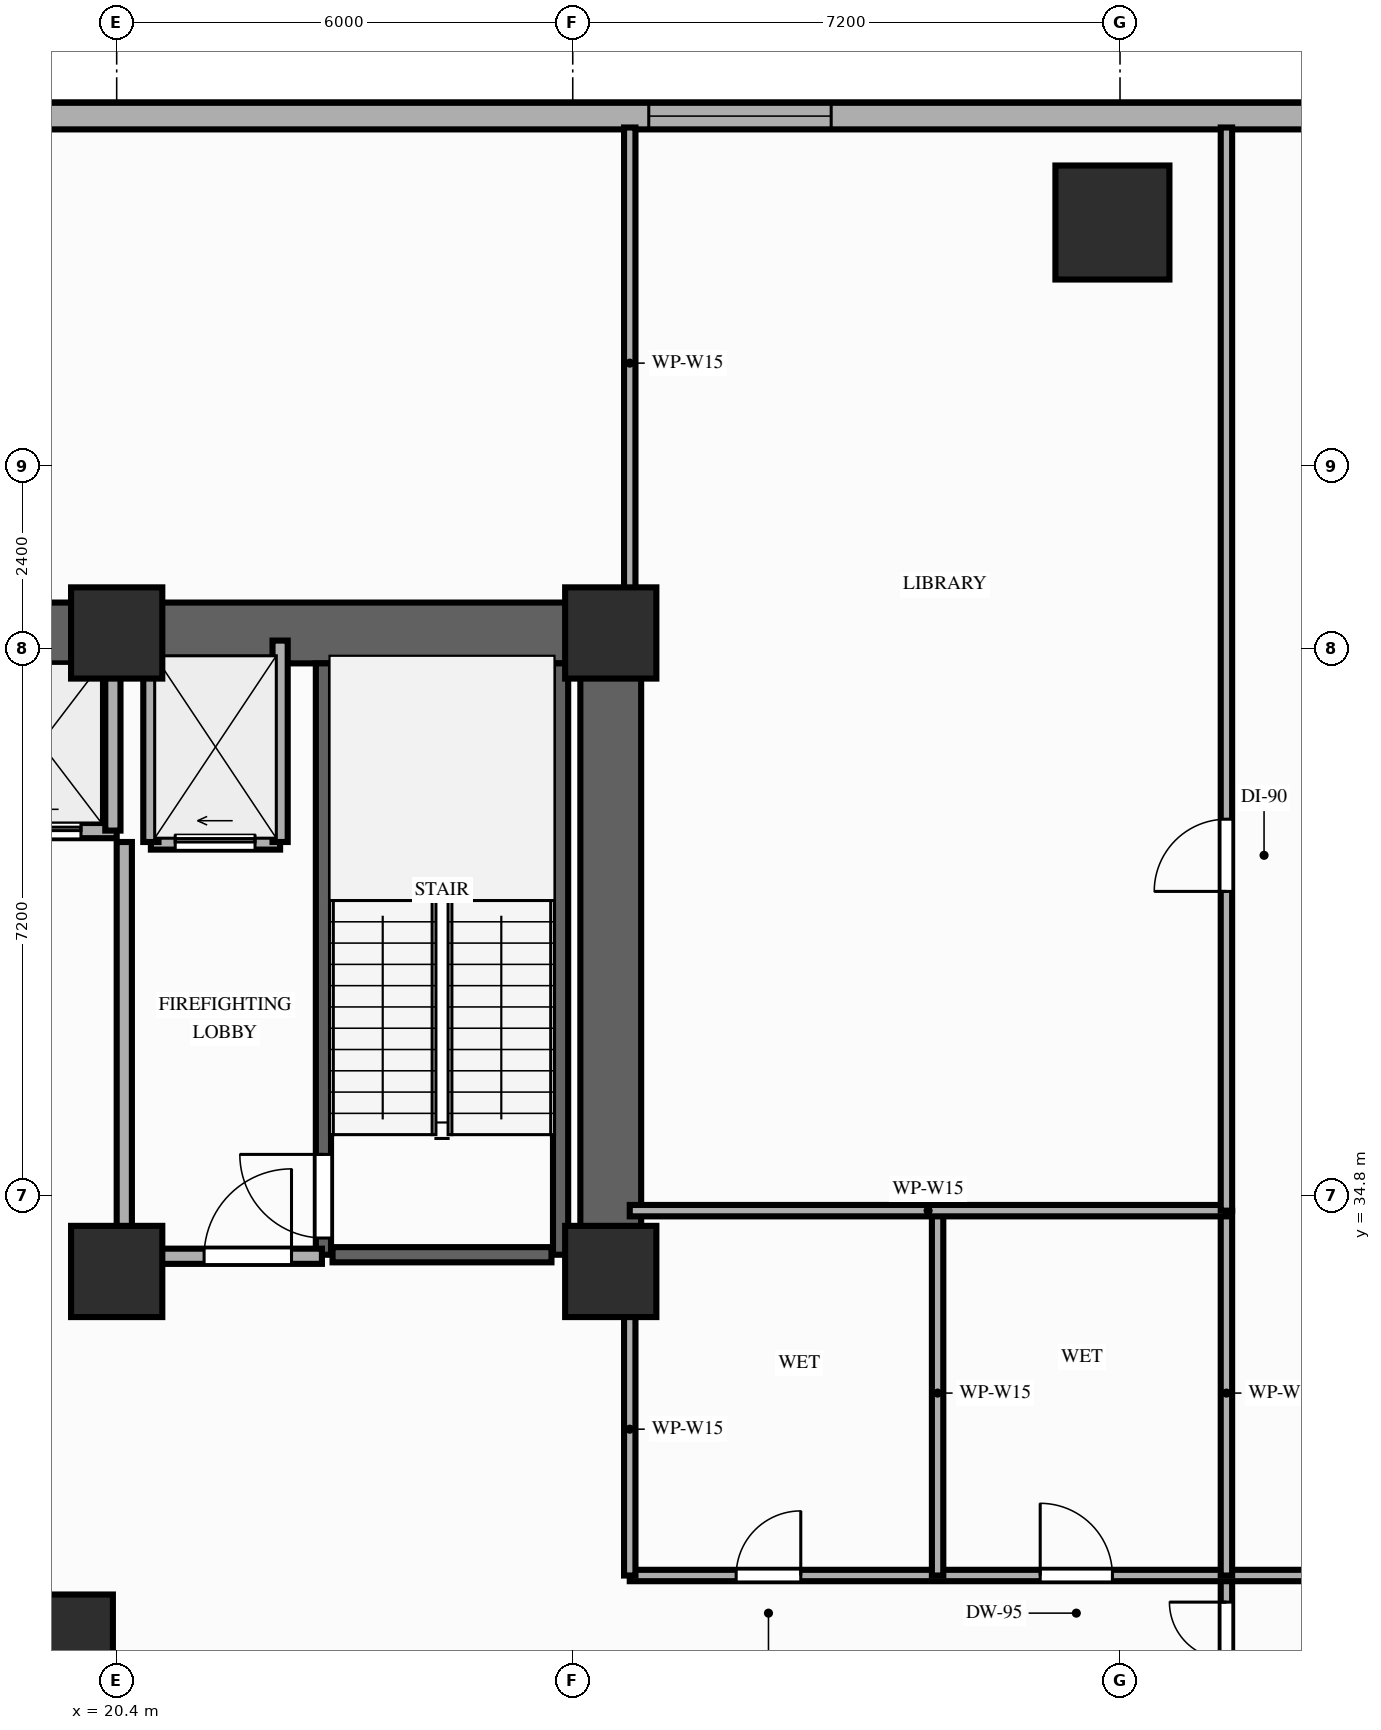
"""IFC4 building model, lengths in metres.
Left out: names, types, materials, properties, quantities, classifications, styles, units other than length and angle.
Written with IfcOpenShell. Run it as: python <this file> out.ifc"""

import sys

from ifc_helpers import new_model, si_unit, direction, frame, frame_2d, origin, origin_2d, place, context, subcontext, project, spatial, rectangle, extrude, element, fill, save


model = new_model("IFC4")
c1 = context("Model", 3, precision=1e-05, world=origin(), true_north=direction((0.0, 1.0)))
c2 = subcontext(c1, "Body", "Model", "MODEL_VIEW")
j1 = project(units=[si_unit("LENGTHUNIT", "METRE"), si_unit("PLANEANGLEUNIT", "RADIAN")], contexts=[c1])
p1 = place(None, origin())
s1 = spatial("IfcSite", under=j1, at=p1, CompositionType="ELEMENT")
p2 = place(p1, origin())
s2 = spatial("IfcBuilding", under=s1, at=p2, CompositionType="ELEMENT")
p3 = place(p2, frame((0.0, 0.0, 17.6)))
s3 = spatial("IfcBuildingStorey", under=s2, at=p3, CompositionType="ELEMENT", Elevation=17.6)
for number, where, z_axis, x_axis in (
    (1, (20.4, 33.8, 0.0), (0.0, 0.0, 1.0), (1.0, 0.0, 0.0)),
    (2, (26.9, 33.8, 0.0), (0.0, 0.0, 1.0), (1.0, 0.0, 0.0)),
    (3, (20.4, 42.2, 0.0), (0.0, 0.0, 1.0), (1.0, 0.0, 0.0)),
    (4, (26.9, 42.2, 0.0), (0.0, 0.0, 1.0), (1.0, 0.0, 0.0)),
):
    element("IfcColumn", number, at=place(p3, frame(where, z_axis=z_axis, x_axis=x_axis)), inside=s3, PredefinedType="COLUMN", context=c2, shape_type="SweptSolid", body=[
        extrude(rectangle(XDim=1.2, YDim=1.2, at=origin_2d()), origin(), (0.0, 0.0, 1.0), 4.2),
    ])
for number, where, z_axis, x_axis in (
    (5, (19.6, 28.8, 0.0), (0.0, 0.0, 1.0), (1.0, 0.0, 0.0)),
    (6, (33.5, 47.6, 0.0), (0.0, 0.0, 1.0), (1.0, 0.0, 0.0)),
):
    element("IfcColumn", number, at=place(p3, frame(where, z_axis=z_axis, x_axis=x_axis)), inside=s3, PredefinedType="COLUMN", context=c2, shape_type="SweptSolid", body=[
        extrude(rectangle(XDim=1.5, YDim=1.5, at=origin_2d()), origin(), (0.0, 0.0, 1.0), 4.2),
    ])
p4 = place(p3, frame((73.2, 49.0, 0.0), z_axis=(0.0, 0.0, 1.0), x_axis=(-1.0, 0.0, 0.0)))
e7 = element("IfcWall", 7, at=p4, inside=s3, PredefinedType="STANDARD", context=c2, shape_type="SweptSolid", body=[
    extrude(rectangle(XDim=69.6, YDim=0.35, at=frame_2d((34.8, 0.0))), origin(), (0.0, 0.0, 1.0), 3.9),
])
p5 = place(p4, frame((3.4, 0.0, 0.9)))
e8 = element("IfcOpeningElement", 8, at=p5, cuts=e7, PredefinedType="OPENING", context=c2, shape_type="SweptSolid", body=[
    extrude(rectangle(XDim=2.4, YDim=2.15, at=frame_2d((1.2, 1.075))), frame((0.0, 0.185, 0.0), z_axis=(0.0, -1.0, 0.0), x_axis=(1.0, 0.0, 0.0)), (0.0, 0.0, 1.0), 0.37),
])
p6 = place(p4, frame((19.2, 0.0, 0.9)))
e9 = element("IfcOpeningElement", 9, at=p6, cuts=e7, PredefinedType="OPENING", context=c2, shape_type="SweptSolid", body=[
    extrude(rectangle(XDim=2.4, YDim=2.15, at=frame_2d((1.2, 1.075))), frame((0.0, 0.185, 0.0), z_axis=(0.0, -1.0, 0.0), x_axis=(1.0, 0.0, 0.0)), (0.0, 0.0, 1.0), 0.37),
])
p7 = place(p4, frame((31.2, 0.0, 0.9)))
e10 = element("IfcOpeningElement", 10, at=p7, cuts=e7, PredefinedType="OPENING", context=c2, shape_type="SweptSolid", body=[
    extrude(rectangle(XDim=2.4, YDim=2.15, at=frame_2d((1.2, 1.075))), frame((0.0, 0.185, 0.0), z_axis=(0.0, -1.0, 0.0), x_axis=(1.0, 0.0, 0.0)), (0.0, 0.0, 1.0), 0.37),
])
p8 = place(p4, frame((43.4, 0.0, 0.9)))
e11 = element("IfcOpeningElement", 11, at=p8, cuts=e7, PredefinedType="OPENING", context=c2, shape_type="SweptSolid", body=[
    extrude(rectangle(XDim=2.4, YDim=2.15, at=frame_2d((1.2, 1.075))), frame((0.0, 0.185, 0.0), z_axis=(0.0, -1.0, 0.0), x_axis=(1.0, 0.0, 0.0)), (0.0, 0.0, 1.0), 0.37),
])
p9 = place(p4, frame((55.6, 0.0, 0.9)))
e12 = element("IfcOpeningElement", 12, at=p9, cuts=e7, PredefinedType="OPENING", context=c2, shape_type="SweptSolid", body=[
    extrude(rectangle(XDim=2.4, YDim=2.15, at=frame_2d((1.2, 1.075))), frame((0.0, 0.185, 0.0), z_axis=(0.0, -1.0, 0.0), x_axis=(1.0, 0.0, 0.0)), (0.0, 0.0, 1.0), 0.37),
])
p10 = place(p3, frame((6.45, 42.2, 0.0), z_axis=(0.0, 0.0, 1.0), x_axis=(1.0, 0.0, 0.0)))
e13 = element("IfcWall", 13, at=p10, inside=s3, PredefinedType="SHEAR", context=c2, shape_type="SweptSolid", body=[
    extrude(rectangle(XDim=20.45, YDim=0.8, at=frame_2d((10.225, 0.0))), origin(), (0.0, 0.0, 1.0), 3.9),
])
p11 = place(p3, frame((26.9, 33.8, 0.0), z_axis=(0.0, 0.0, 1.0), x_axis=(0.0, 1.0, 0.0)))
e14 = element("IfcWall", 14, at=p11, inside=s3, PredefinedType="SHEAR", context=c2, shape_type="SweptSolid", body=[
    extrude(rectangle(XDim=7.95, YDim=0.8, at=frame_2d((3.975, 0.0))), origin(), (0.0, 0.0, 1.0), 3.9),
])
p12 = place(p3, frame((23.12, 34.02, 0.0), z_axis=(0.0, 0.0, 1.0), x_axis=(0.0, 1.0, 0.0)))
e15 = element("IfcWall", 15, at=p12, inside=s3, PredefinedType="SHEAR", context=c2, shape_type="SweptSolid", body=[
    extrude(rectangle(XDim=7.78, YDim=0.2, at=frame_2d((3.89, 0.0))), origin(), (0.0, 0.0, 1.0), 3.9),
])
p13 = place(p12, frame((0.22, 0.0, 0.0)))
e16 = element("IfcOpeningElement", 16, at=p13, cuts=e15, PredefinedType="OPENING", context=c2, shape_type="SweptSolid", body=[
    extrude(rectangle(XDim=1.1, YDim=2.15, at=frame_2d((0.55, 1.075))), frame((0.0, 0.11, 0.0), z_axis=(0.0, -1.0, 0.0), x_axis=(1.0, 0.0, 0.0)), (0.0, 0.0, 1.0), 0.22),
])
p14 = place(p3, frame((26.24, 34.02, 0.0), z_axis=(0.0, 0.0, 1.0), x_axis=(0.0, 1.0, 0.0)))
e17 = element("IfcWall", 17, at=p14, inside=s3, PredefinedType="SHEAR", context=c2, shape_type="SweptSolid", body=[
    extrude(rectangle(XDim=7.78, YDim=0.2, at=frame_2d((3.89, 0.0))), origin(), (0.0, 0.0, 1.0), 3.9),
])
p15 = place(p3, frame((23.24, 34.02, 0.0), z_axis=(0.0, 0.0, 1.0), x_axis=(1.0, 0.0, 0.0)))
e18 = element("IfcWall", 18, at=p15, inside=s3, PredefinedType="SHEAR", context=c2, shape_type="SweptSolid", body=[
    extrude(rectangle(XDim=2.88, YDim=0.2, at=frame_2d((1.44, 0.0))), origin(), (0.0, 0.0, 1.0), 3.9),
])
p16 = place(p3, frame((20.85, 39.45, 0.0), z_axis=(0.0, 0.0, 1.0), x_axis=(1.0, 0.0, 0.0)))
e19 = element("IfcWall", 19, at=p16, inside=s3, PredefinedType="MOVABLE", context=c2, shape_type="SweptSolid", body=[
    extrude(rectangle(XDim=1.7, YDim=0.2, at=frame_2d((0.85, 0.0))), origin(), (0.0, 0.0, 1.0), 3.9),
])
p17 = place(p16, frame((0.32, 0.0, 0.0)))
e20 = element("IfcOpeningElement", 20, at=p17, cuts=e19, PredefinedType="OPENING", context=c2, shape_type="SweptSolid", body=[
    extrude(rectangle(XDim=1.05, YDim=2.15, at=frame_2d((0.525, 1.075))), frame((0.0, 0.11, 0.0), z_axis=(0.0, -1.0, 0.0), x_axis=(1.0, 0.0, 0.0)), (0.0, 0.0, 1.0), 0.22),
])
for number, where, z_axis, x_axis in (
    (21, (20.85, 39.45, 0.0), (0.0, 0.0, 1.0), (0.0, 1.0, 0.0)),
    (22, (22.55, 39.45, 0.0), (0.0, 0.0, 1.0), (0.0, 1.0, 0.0)),
):
    element("IfcWall", number, at=place(p3, frame(where, z_axis=z_axis, x_axis=x_axis)), inside=s3, PredefinedType="MOVABLE", context=c2, shape_type="SweptSolid", body=[
        extrude(rectangle(XDim=2.65, YDim=0.2, at=frame_2d((1.325, 0.0))), origin(), (0.0, 0.0, 1.0), 3.9),
    ])
p18 = place(p3, frame((20.5, 34.0, 0.0), z_axis=(0.0, 0.0, 1.0), x_axis=(0.0, 1.0, 0.0)))
e23 = element("IfcWall", 23, at=p18, inside=s3, PredefinedType="PARTITIONING", context=c2, shape_type="SweptSolid", body=[
    extrude(rectangle(XDim=5.45, YDim=0.2, at=frame_2d((2.725, 0.0))), origin(), (0.0, 0.0, 1.0), 3.18),
])
p19 = place(p3, frame((20.5, 34.0, 0.0), z_axis=(0.0, 0.0, 1.0), x_axis=(1.0, 0.0, 0.0)))
e24 = element("IfcWall", 24, at=p19, inside=s3, PredefinedType="PARTITIONING", context=c2, shape_type="SweptSolid", body=[
    extrude(rectangle(XDim=2.6, YDim=0.2, at=frame_2d((1.3, 0.0))), origin(), (0.0, 0.0, 1.0), 3.18),
])
p20 = place(p19, frame((1.05, 0.0, 0.0)))
e25 = element("IfcOpeningElement", 25, at=p20, cuts=e24, PredefinedType="OPENING", context=c2, shape_type="SweptSolid", body=[
    extrude(rectangle(XDim=1.15, YDim=2.15, at=frame_2d((0.575, 1.075))), frame((0.0, 0.11, 0.0), z_axis=(0.0, -1.0, 0.0), x_axis=(1.0, 0.0, 0.0)), (0.0, 0.0, 1.0), 0.22),
])
p21 = place(p3, frame((13.0, 39.6, 0.0), z_axis=(0.0, 0.0, 1.0), x_axis=(1.0, 0.0, 0.0)))
e26 = element("IfcWall", 26, at=p21, inside=s3, PredefinedType="MOVABLE", context=c2, shape_type="SweptSolid", body=[
    extrude(rectangle(XDim=7.4, YDim=0.2, at=frame_2d((3.7, 0.0))), origin(), (0.0, 0.0, 1.0), 3.9),
])
p22 = place(p21, frame((0.47, 0.0, 0.0)))
e27 = element("IfcOpeningElement", 27, at=p22, cuts=e26, PredefinedType="OPENING", context=c2, shape_type="SweptSolid", body=[
    extrude(rectangle(XDim=1.05, YDim=2.15, at=frame_2d((0.525, 1.075))), frame((0.0, 0.11, 0.0), z_axis=(0.0, -1.0, 0.0), x_axis=(1.0, 0.0, 0.0)), (0.0, 0.0, 1.0), 0.22),
])
p23 = place(p21, frame((2.28, 0.0, 0.0)))
e28 = element("IfcOpeningElement", 28, at=p23, cuts=e26, PredefinedType="OPENING", context=c2, shape_type="SweptSolid", body=[
    extrude(rectangle(XDim=1.05, YDim=2.15, at=frame_2d((0.525, 1.075))), frame((0.0, 0.11, 0.0), z_axis=(0.0, -1.0, 0.0), x_axis=(1.0, 0.0, 0.0)), (0.0, 0.0, 1.0), 0.22),
])
p24 = place(p21, frame((4.08, 0.0, 0.0)))
e29 = element("IfcOpeningElement", 29, at=p24, cuts=e26, PredefinedType="OPENING", context=c2, shape_type="SweptSolid", body=[
    extrude(rectangle(XDim=1.05, YDim=2.15, at=frame_2d((0.525, 1.075))), frame((0.0, 0.11, 0.0), z_axis=(0.0, -1.0, 0.0), x_axis=(1.0, 0.0, 0.0)), (0.0, 0.0, 1.0), 0.22),
])
p25 = place(p21, frame((5.88, 0.0, 0.0)))
e30 = element("IfcOpeningElement", 30, at=p25, cuts=e26, PredefinedType="OPENING", context=c2, shape_type="SweptSolid", body=[
    extrude(rectangle(XDim=1.05, YDim=2.15, at=frame_2d((0.525, 1.075))), frame((0.0, 0.11, 0.0), z_axis=(0.0, -1.0, 0.0), x_axis=(1.0, 0.0, 0.0)), (0.0, 0.0, 1.0), 0.22),
])
p26 = place(p3, frame((20.35, 39.6, 0.0), z_axis=(0.0, 0.0, 1.0), x_axis=(0.0, 1.0, 0.0)))
e31 = element("IfcWall", 31, at=p26, inside=s3, PredefinedType="MOVABLE", context=c2, shape_type="SweptSolid", body=[
    extrude(rectangle(XDim=2.18, YDim=0.2, at=frame_2d((1.09, 0.0))), origin(), (0.0, 0.0, 1.0), 3.9),
])
p27 = place(p3, frame((35.0, 27.6, 0.0), z_axis=(0.0, 0.0, 1.0), x_axis=(0.0, 1.0, 0.0)))
e32 = element("IfcWall", 32, at=p27, inside=s3, PredefinedType="PARTITIONING", context=c2, shape_type="SweptSolid", body=[
    extrude(rectangle(XDim=2.2, YDim=0.15, at=frame_2d((1.1, 0.0))), origin(), (0.0, 0.0, 1.0), 3.18),
])
p28 = place(p27, frame((0.35, 0.0, 0.0)))
e33 = element("IfcOpeningElement", 33, at=p28, cuts=e32, PredefinedType="OPENING", context=c2, shape_type="SweptSolid", body=[
    extrude(rectangle(XDim=1.5, YDim=2.18, at=frame_2d((0.75, 1.09))), frame((0.0, 0.085, 0.0), z_axis=(0.0, -1.0, 0.0), x_axis=(1.0, 0.0, 0.0)), (0.0, 0.0, 1.0), 0.17),
])
p29 = place(p3, frame((27.15, 29.8, 0.0), z_axis=(0.0, 0.0, 1.0), x_axis=(1.0, 0.0, 0.0)))
e34 = element("IfcWall", 34, at=p29, inside=s3, PredefinedType="PARTITIONING", context=c2, shape_type="SweptSolid", body=[
    extrude(rectangle(XDim=35.25, YDim=0.15, at=frame_2d((17.625, 0.0))), origin(), (0.0, 0.0, 1.0), 3.18),
])
p30 = place(p29, frame((25.0, 0.0, 0.0)))
e35 = element("IfcOpeningElement", 35, at=p30, cuts=e34, PredefinedType="OPENING", context=c2, shape_type="SweptSolid", body=[
    extrude(rectangle(XDim=1.0, YDim=2.15, at=frame_2d((0.5, 1.075))), frame((0.0, 0.085, 0.0), z_axis=(0.0, -1.0, 0.0), x_axis=(1.0, 0.0, 0.0)), (0.0, 0.0, 1.0), 0.17),
])
p31 = place(p29, frame((1.4, 0.0, 0.0)))
e36 = element("IfcOpeningElement", 36, at=p31, cuts=e34, PredefinedType="OPENING", context=c2, shape_type="SweptSolid", body=[
    extrude(rectangle(XDim=0.85, YDim=2.1, at=frame_2d((0.425, 1.05))), frame((0.0, 0.085, 0.0), z_axis=(0.0, -1.0, 0.0), x_axis=(1.0, 0.0, 0.0)), (0.0, 0.0, 1.0), 0.17),
])
p32 = place(p29, frame((5.4, 0.0, 0.0)))
e37 = element("IfcOpeningElement", 37, at=p32, cuts=e34, PredefinedType="OPENING", context=c2, shape_type="SweptSolid", body=[
    extrude(rectangle(XDim=0.95, YDim=2.1, at=frame_2d((0.475, 1.05))), frame((0.0, 0.085, 0.0), z_axis=(0.0, -1.0, 0.0), x_axis=(1.0, 0.0, 0.0)), (0.0, 0.0, 1.0), 0.17),
])
p33 = place(p29, frame((12.6, 0.0, 0.0)))
e38 = element("IfcOpeningElement", 38, at=p33, cuts=e34, PredefinedType="OPENING", context=c2, shape_type="SweptSolid", body=[
    extrude(rectangle(XDim=1.0, YDim=2.15, at=frame_2d((0.5, 1.075))), frame((0.0, 0.085, 0.0), z_axis=(0.0, -1.0, 0.0), x_axis=(1.0, 0.0, 0.0)), (0.0, 0.0, 1.0), 0.17),
])
p34 = place(p3, frame((27.15, 29.8, 0.0), z_axis=(0.0, 0.0, 1.0), x_axis=(0.0, 1.0, 0.0)))
e39 = element("IfcWall", 39, at=p34, inside=s3, PredefinedType="PARTITIONING", context=c2, shape_type="SweptSolid", body=[
    extrude(rectangle(XDim=3.85, YDim=0.15, at=frame_2d((1.925, 0.0))), origin(), (0.0, 0.0, 1.0), 3.18),
])
p35 = place(p3, frame((27.15, 42.65, 0.0), z_axis=(0.0, 0.0, 1.0), x_axis=(0.0, 1.0, 0.0)))
e40 = element("IfcWall", 40, at=p35, inside=s3, PredefinedType="PARTITIONING", context=c2, shape_type="SweptSolid", body=[
    extrude(rectangle(XDim=6.2, YDim=0.15, at=frame_2d((3.1, 0.0))), origin(), (0.0, 0.0, 1.0), 3.9),
])
for number, where, z_axis, x_axis in (
    (41, (31.2, 29.8, 0.0), (0.0, 0.0, 1.0), (0.0, 1.0, 0.0)),
    (42, (35.0, 29.8, 0.0), (0.0, 0.0, 1.0), (0.0, 1.0, 0.0)),
):
    element("IfcWall", number, at=place(p3, frame(where, z_axis=z_axis, x_axis=x_axis)), inside=s3, PredefinedType="PARTITIONING", context=c2, shape_type="SweptSolid", body=[
        extrude(rectangle(XDim=4.8, YDim=0.15, at=frame_2d((2.4, 0.0))), origin(), (0.0, 0.0, 1.0), 3.9),
    ])
p36 = place(p3, frame((27.15, 34.6, 0.0), z_axis=(0.0, 0.0, 1.0), x_axis=(1.0, 0.0, 0.0)))
e43 = element("IfcWall", 43, at=p36, inside=s3, PredefinedType="PARTITIONING", context=c2, shape_type="SweptSolid", body=[
    extrude(rectangle(XDim=7.85, YDim=0.15, at=frame_2d((3.925, 0.0))), origin(), (0.0, 0.0, 1.0), 3.18),
])
p37 = place(p3, frame((35.0, 34.6, 0.0), z_axis=(0.0, 0.0, 1.0), x_axis=(0.0, 1.0, 0.0)))
e44 = element("IfcWall", 44, at=p37, inside=s3, PredefinedType="PARTITIONING", context=c2, shape_type="SweptSolid", body=[
    extrude(rectangle(XDim=14.25, YDim=0.15, at=frame_2d((7.125, 0.0))), origin(), (0.0, 0.0, 1.0), 3.18),
])
p38 = place(p37, frame((4.2, 0.0, 0.0)))
e45 = element("IfcOpeningElement", 45, at=p38, cuts=e44, PredefinedType="OPENING", context=c2, shape_type="SweptSolid", body=[
    extrude(rectangle(XDim=0.95, YDim=2.15, at=frame_2d((0.475, 1.075))), frame((0.0, 0.085, 0.0), z_axis=(0.0, -1.0, 0.0), x_axis=(1.0, 0.0, 0.0)), (0.0, 0.0, 1.0), 0.17),
])
p39 = place(p8, origin())
e46 = element("IfcWindow", 46, at=p39, inside=s3, PartitioningType="SINGLE_PANEL", PredefinedType="WINDOW", context=c2, shape_type="SweptSolid", body=[
    extrude(rectangle(XDim=2.4, YDim=2.15, at=frame_2d((1.2, 1.075))), frame((0.0, 0.03, 0.0), z_axis=(0.0, -1.0, 0.0), x_axis=(1.0, 0.0, 0.0)), (0.0, 0.0, 1.0), 0.06),
])
fill(e11, e46)
p40 = place(p13, origin())
e47 = element("IfcDoor", 47, at=p40, inside=s3, OperationType="SINGLE_SWING_RIGHT", PredefinedType="DOOR", context=c2, shape_type="SweptSolid", body=[
    extrude(rectangle(XDim=1.1, YDim=2.15, at=frame_2d((0.55, 1.075))), frame((0.0, 0.025, 0.0), z_axis=(0.0, -1.0, 0.0), x_axis=(1.0, 0.0, 0.0)), (0.0, 0.0, 1.0), 0.05),
])
fill(e16, e47)
p41 = place(p17, origin())
e48 = element("IfcDoor", 48, at=p41, inside=s3, OperationType="SLIDING_TO_LEFT", PredefinedType="DOOR", context=c2, shape_type="SweptSolid", body=[
    extrude(rectangle(XDim=1.05, YDim=2.15, at=frame_2d((0.525, 1.075))), frame((0.0, 0.025, 0.0), z_axis=(0.0, -1.0, 0.0), x_axis=(1.0, 0.0, 0.0)), (0.0, 0.0, 1.0), 0.05),
])
fill(e20, e48)
p42 = place(p20, origin())
e49 = element("IfcDoor", 49, at=p42, inside=s3, OperationType="SINGLE_SWING_RIGHT", PredefinedType="DOOR", context=c2, shape_type="SweptSolid", body=[
    extrude(rectangle(XDim=1.15, YDim=2.15, at=frame_2d((0.575, 1.075))), frame((0.0, 0.025, 0.0), z_axis=(0.0, -1.0, 0.0), x_axis=(1.0, 0.0, 0.0)), (0.0, 0.0, 1.0), 0.05),
])
fill(e25, e49)
p43 = place(p25, origin())
e50 = element("IfcDoor", 50, at=p43, inside=s3, OperationType="SLIDING_TO_LEFT", PredefinedType="DOOR", context=c2, shape_type="SweptSolid", body=[
    extrude(rectangle(XDim=1.05, YDim=2.15, at=frame_2d((0.525, 1.075))), frame((0.0, 0.025, 0.0), z_axis=(0.0, -1.0, 0.0), x_axis=(1.0, 0.0, 0.0)), (0.0, 0.0, 1.0), 0.05),
])
fill(e30, e50)
p44 = place(p28, origin())
e51 = element("IfcDoor", 51, at=p44, inside=s3, OperationType="DOUBLE_DOOR_SINGLE_SWING", PredefinedType="DOOR", context=c2, shape_type="SweptSolid", body=[
    extrude(rectangle(XDim=1.5, YDim=2.18, at=frame_2d((0.75, 1.09))), frame((0.0, 0.025, 0.0), z_axis=(0.0, -1.0, 0.0), x_axis=(1.0, 0.0, 0.0)), (0.0, 0.0, 1.0), 0.05),
])
fill(e33, e51)
p45 = place(p31, origin())
e52 = element("IfcDoor", 52, at=p45, inside=s3, OperationType="SINGLE_SWING_RIGHT", PredefinedType="DOOR", context=c2, shape_type="SweptSolid", body=[
    extrude(rectangle(XDim=0.85, YDim=2.1, at=frame_2d((0.425, 1.05))), frame((0.0, 0.025, 0.0), z_axis=(0.0, -1.0, 0.0), x_axis=(1.0, 0.0, 0.0)), (0.0, 0.0, 1.0), 0.05),
])
fill(e36, e52)
p46 = place(p32, origin())
e53 = element("IfcDoor", 53, at=p46, inside=s3, OperationType="SINGLE_SWING_LEFT", PredefinedType="DOOR", context=c2, shape_type="SweptSolid", body=[
    extrude(rectangle(XDim=0.95, YDim=2.1, at=frame_2d((0.475, 1.05))), frame((0.0, 0.025, 0.0), z_axis=(0.0, -1.0, 0.0), x_axis=(1.0, 0.0, 0.0)), (0.0, 0.0, 1.0), 0.05),
])
fill(e37, e53)
p47 = place(p38, origin())
e54 = element("IfcDoor", 54, at=p47, inside=s3, OperationType="SINGLE_SWING_LEFT", PredefinedType="DOOR", context=c2, shape_type="SweptSolid", body=[
    extrude(rectangle(XDim=0.95, YDim=2.15, at=frame_2d((0.475, 1.075))), frame((0.0, 0.025, 0.0), z_axis=(0.0, -1.0, 0.0), x_axis=(1.0, 0.0, 0.0)), (0.0, 0.0, 1.0), 0.05),
])
fill(e45, e54)
save(model, sys.argv[1])
